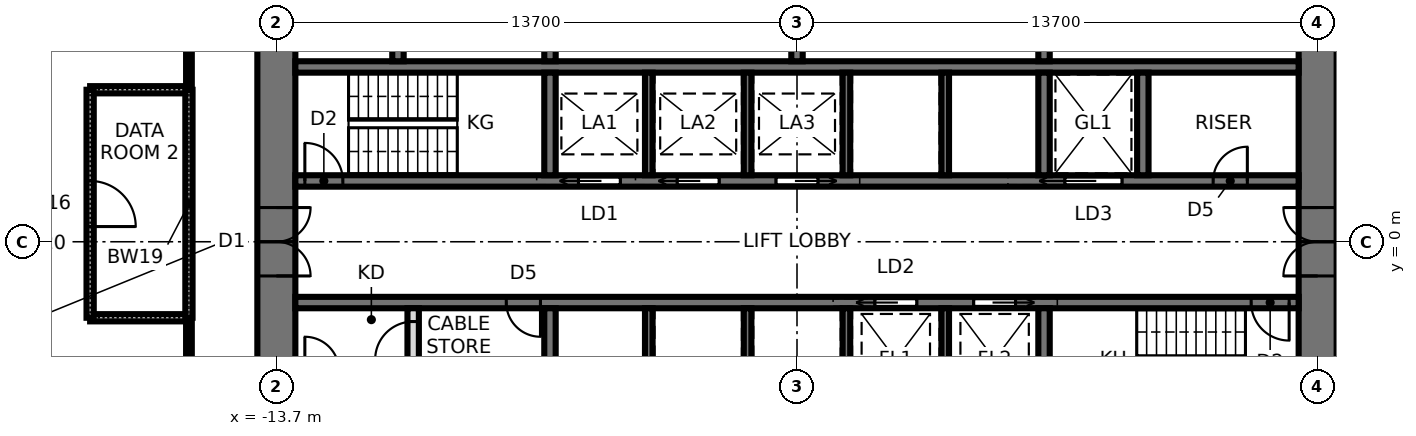
"""IFC4 building model, lengths in metres.
Left out: names, types, materials, properties, quantities, classifications, styles, units other than length and angle.
Written with IfcOpenShell. Run it as: python <this file> out.ifc"""

import sys

from ifc_helpers import new_model, si_unit, direction, frame, frame_2d, origin, place, context, subcontext, project, spatial, rectangle, extrude, element, fill, save


model = new_model("IFC4")
c1 = context("Model", 3, precision=1e-05, world=origin(), true_north=direction((0.0, 1.0)))
c2 = subcontext(c1, "Body", "Model", "MODEL_VIEW")
j1 = project(units=[si_unit("LENGTHUNIT", "METRE"), si_unit("PLANEANGLEUNIT", "RADIAN")], contexts=[c1])
p1 = place(None, origin())
s1 = spatial("IfcSite", under=j1, at=p1, CompositionType="ELEMENT")
p2 = place(p1, origin())
s2 = spatial("IfcBuilding", under=s1, at=p2, CompositionType="ELEMENT")
p3 = place(p2, frame((0.0, 0.0, 44.8)))
s3 = spatial("IfcBuildingStorey", under=s2, at=p3, CompositionType="ELEMENT", Elevation=44.8)
p4 = place(p3, frame((13.7, -9.5, 0.0), z_axis=(0.0, 0.0, 1.0), x_axis=(0.0, 1.0, 0.0)))
e1 = element("IfcWall", 1, at=p4, inside=s3, PredefinedType="SHEAR", context=c2, shape_type="SweptSolid", body=[
    extrude(rectangle(XDim=19.0, YDim=1.0, at=frame_2d((9.5, 0.0))), origin(), (0.0, 0.0, 1.0), 4.2),
])
p5 = place(p4, frame((8.6, 0.0, 0.0)))
e2 = element("IfcOpeningElement", 2, at=p5, cuts=e1, PredefinedType="OPENING", context=c2, shape_type="SweptSolid", body=[
    extrude(rectangle(XDim=1.8, YDim=2.4, at=frame_2d((0.9, 1.2))), frame((0.0, 0.51, 0.0), z_axis=(0.0, -1.0, 0.0), x_axis=(1.0, 0.0, 0.0)), (0.0, 0.0, 1.0), 1.02),
])
p6 = place(p3, frame((-13.7, 9.5, 0.0), z_axis=(0.0, 0.0, 1.0), x_axis=(0.0, -1.0, 0.0)))
e3 = element("IfcWall", 3, at=p6, inside=s3, PredefinedType="SHEAR", context=c2, shape_type="SweptSolid", body=[
    extrude(rectangle(XDim=19.0, YDim=1.0, at=frame_2d((9.5, 0.0))), origin(), (0.0, 0.0, 1.0), 4.2),
])
p7 = place(p6, frame((8.6, 0.0, 0.0)))
e4 = element("IfcOpeningElement", 4, at=p7, cuts=e3, PredefinedType="OPENING", context=c2, shape_type="SweptSolid", body=[
    extrude(rectangle(XDim=1.8, YDim=2.4, at=frame_2d((0.9, 1.2))), frame((0.0, 0.51, 0.0), z_axis=(0.0, -1.0, 0.0), x_axis=(1.0, 0.0, 0.0)), (0.0, 0.0, 1.0), 1.02),
])
p8 = place(p3, frame((-13.2, 1.6, 0.0), z_axis=(0.0, 0.0, 1.0), x_axis=(1.0, 0.0, 0.0)))
e5 = element("IfcWall", 5, at=p8, inside=s3, PredefinedType="SHEAR", context=c2, shape_type="SweptSolid", body=[
    extrude(rectangle(XDim=26.4, YDim=0.3, at=frame_2d((13.2, 0.0))), origin(), (0.0, 0.0, 1.0), 4.2),
])
p9 = place(p8, frame((0.25, 0.0, 0.0)))
e6 = element("IfcOpeningElement", 6, at=p9, cuts=e5, PredefinedType="OPENING", context=c2, shape_type="SweptSolid", body=[
    extrude(rectangle(XDim=1.0, YDim=2.1, at=frame_2d((0.5, 1.05))), frame((0.0, 0.16, 0.0), z_axis=(0.0, -1.0, 0.0), x_axis=(1.0, 0.0, 0.0)), (0.0, 0.0, 1.0), 0.32),
])
p10 = place(p8, frame((20.25, 0.0, 0.0)))
e7 = element("IfcOpeningElement", 7, at=p10, cuts=e5, PredefinedType="OPENING", context=c2, shape_type="SweptSolid", body=[
    extrude(rectangle(XDim=1.5, YDim=2.4, at=frame_2d((0.75, 1.2))), frame((0.0, 0.16, 0.0), z_axis=(0.0, -1.0, 0.0), x_axis=(1.0, 0.0, 0.0)), (0.0, 0.0, 1.0), 0.32),
])
p11 = place(p8, frame((7.45, 0.0, 0.0)))
e8 = element("IfcOpeningElement", 8, at=p11, cuts=e5, PredefinedType="OPENING", context=c2, shape_type="SweptSolid", body=[
    extrude(rectangle(XDim=1.1, YDim=2.3, at=frame_2d((0.55, 1.15))), frame((0.0, 0.16, 0.0), z_axis=(0.0, -1.0, 0.0), x_axis=(1.0, 0.0, 0.0)), (0.0, 0.0, 1.0), 0.32),
])
p12 = place(p8, frame((10.05, 0.0, 0.0)))
e9 = element("IfcOpeningElement", 9, at=p12, cuts=e5, PredefinedType="OPENING", context=c2, shape_type="SweptSolid", body=[
    extrude(rectangle(XDim=1.1, YDim=2.3, at=frame_2d((0.55, 1.15))), frame((0.0, 0.16, 0.0), z_axis=(0.0, -1.0, 0.0), x_axis=(1.0, 0.0, 0.0)), (0.0, 0.0, 1.0), 0.32),
])
p13 = place(p8, frame((12.65, 0.0, 0.0)))
e10 = element("IfcOpeningElement", 10, at=p13, cuts=e5, PredefinedType="OPENING", context=c2, shape_type="SweptSolid", body=[
    extrude(rectangle(XDim=1.1, YDim=2.3, at=frame_2d((0.55, 1.15))), frame((0.0, 0.16, 0.0), z_axis=(0.0, -1.0, 0.0), x_axis=(1.0, 0.0, 0.0)), (0.0, 0.0, 1.0), 0.32),
])
p14 = place(p8, frame((24.15, 0.0, 0.0)))
e11 = element("IfcOpeningElement", 11, at=p14, cuts=e5, PredefinedType="OPENING", context=c2, shape_type="SweptSolid", body=[
    extrude(rectangle(XDim=0.9, YDim=2.1, at=frame_2d((0.45, 1.05))), frame((0.0, 0.16, 0.0), z_axis=(0.0, -1.0, 0.0), x_axis=(1.0, 0.0, 0.0)), (0.0, 0.0, 1.0), 0.32),
])
p15 = place(p3, frame((-13.2, -1.6, 0.0), z_axis=(0.0, 0.0, 1.0), x_axis=(1.0, 0.0, 0.0)))
e12 = element("IfcWall", 12, at=p15, inside=s3, PredefinedType="SHEAR", context=c2, shape_type="SweptSolid", body=[
    extrude(rectangle(XDim=26.4, YDim=0.3, at=frame_2d((13.2, 0.0))), origin(), (0.0, 0.0, 1.0), 4.2),
])
p16 = place(p15, frame((25.15, 0.0, 0.0)))
e13 = element("IfcOpeningElement", 13, at=p16, cuts=e12, PredefinedType="OPENING", context=c2, shape_type="SweptSolid", body=[
    extrude(rectangle(XDim=1.0, YDim=2.1, at=frame_2d((0.5, 1.05))), frame((0.0, 0.16, 0.0), z_axis=(0.0, -1.0, 0.0), x_axis=(1.0, 0.0, 0.0)), (0.0, 0.0, 1.0), 0.32),
])
p17 = place(p15, frame((15.25, 0.0, 0.0)))
e14 = element("IfcOpeningElement", 14, at=p17, cuts=e12, PredefinedType="OPENING", context=c2, shape_type="SweptSolid", body=[
    extrude(rectangle(XDim=1.1, YDim=2.3, at=frame_2d((0.55, 1.15))), frame((0.0, 0.16, 0.0), z_axis=(0.0, -1.0, 0.0), x_axis=(1.0, 0.0, 0.0)), (0.0, 0.0, 1.0), 0.32),
])
p18 = place(p15, frame((17.85, 0.0, 0.0)))
e15 = element("IfcOpeningElement", 15, at=p18, cuts=e12, PredefinedType="OPENING", context=c2, shape_type="SweptSolid", body=[
    extrude(rectangle(XDim=1.1, YDim=2.3, at=frame_2d((0.55, 1.15))), frame((0.0, 0.16, 0.0), z_axis=(0.0, -1.0, 0.0), x_axis=(1.0, 0.0, 0.0)), (0.0, 0.0, 1.0), 0.32),
])
p19 = place(p15, frame((5.55, 0.0, 0.0)))
e16 = element("IfcOpeningElement", 16, at=p19, cuts=e12, PredefinedType="OPENING", context=c2, shape_type="SweptSolid", body=[
    extrude(rectangle(XDim=0.9, YDim=2.1, at=frame_2d((0.45, 1.05))), frame((0.0, 0.16, 0.0), z_axis=(0.0, -1.0, 0.0), x_axis=(1.0, 0.0, 0.0)), (0.0, 0.0, 1.0), 0.32),
])
p20 = place(p3, frame((-13.2, 4.6, 0.0), z_axis=(0.0, 0.0, 1.0), x_axis=(1.0, 0.0, 0.0)))
e17 = element("IfcWall", 17, at=p20, inside=s3, PredefinedType="SHEAR", context=c2, shape_type="SweptSolid", body=[
    extrude(rectangle(XDim=26.4, YDim=0.3, at=frame_2d((13.2, 0.0))), origin(), (0.0, 0.0, 1.0), 4.2),
])
p21 = place(p3, frame((-6.5, 1.75, 0.0), z_axis=(0.0, 0.0, 1.0), x_axis=(0.0, 1.0, 0.0)))
e18 = element("IfcWall", 18, at=p21, inside=s3, PredefinedType="SHEAR", context=c2, shape_type="SweptSolid", body=[
    extrude(rectangle(XDim=2.7, YDim=0.3, at=frame_2d((1.35, 0.0))), origin(), (0.0, 0.0, 1.0), 4.2),
])
p22 = place(p3, frame((-6.5, 4.75, 0.0), z_axis=(0.0, 0.0, 1.0), x_axis=(0.0, 1.0, 0.0)))
e19 = element("IfcWall", 19, at=p22, inside=s3, PredefinedType="SHEAR", context=c2, shape_type="SweptSolid", body=[
    extrude(rectangle(XDim=3.75, YDim=0.3, at=frame_2d((1.875, 0.0))), origin(), (0.0, 0.0, 1.0), 4.2),
])
p23 = place(p3, frame((6.5, 1.75, 0.0), z_axis=(0.0, 0.0, 1.0), x_axis=(0.0, 1.0, 0.0)))
e20 = element("IfcWall", 20, at=p23, inside=s3, PredefinedType="SHEAR", context=c2, shape_type="SweptSolid", body=[
    extrude(rectangle(XDim=2.7, YDim=0.3, at=frame_2d((1.35, 0.0))), origin(), (0.0, 0.0, 1.0), 4.2),
])
p24 = place(p3, frame((6.5, 4.75, 0.0), z_axis=(0.0, 0.0, 1.0), x_axis=(0.0, 1.0, 0.0)))
e21 = element("IfcWall", 21, at=p24, inside=s3, PredefinedType="SHEAR", context=c2, shape_type="SweptSolid", body=[
    extrude(rectangle(XDim=3.75, YDim=0.3, at=frame_2d((1.875, 0.0))), origin(), (0.0, 0.0, 1.0), 4.2),
])
for number, where, z_axis, x_axis in (
    (22, (-3.9, 1.75, 0.0), (0.0, 0.0, 1.0), (0.0, 1.0, 0.0)),
    (23, (-1.3, 1.75, 0.0), (0.0, 0.0, 1.0), (0.0, 1.0, 0.0)),
    (24, (1.3, 1.75, 0.0), (0.0, 0.0, 1.0), (0.0, 1.0, 0.0)),
    (25, (3.9, 1.75, 0.0), (0.0, 0.0, 1.0), (0.0, 1.0, 0.0)),
):
    element("IfcWall", number, at=place(p3, frame(where, z_axis=z_axis, x_axis=x_axis)), inside=s3, PredefinedType="SHEAR", context=c2, shape_type="SweptSolid", body=[
        extrude(rectangle(XDim=2.7, YDim=0.2, at=frame_2d((1.35, 0.0))), origin(), (0.0, 0.0, 1.0), 4.2),
    ])
p25 = place(p3, frame((0.0, 4.75, 0.0), z_axis=(0.0, 0.0, 1.0), x_axis=(0.0, 1.0, 0.0)))
e26 = element("IfcWall", 26, at=p25, inside=s3, PredefinedType="SHEAR", context=c2, shape_type="SweptSolid", body=[
    extrude(rectangle(XDim=3.75, YDim=0.3, at=frame_2d((1.875, 0.0))), origin(), (0.0, 0.0, 1.0), 4.2),
])
for number, where, z_axis, x_axis in (
    (27, (-6.5, -1.75, 0.0), (0.0, 0.0, 1.0), (0.0, -1.0, 0.0)),
    (28, (6.5, -1.75, 0.0), (0.0, 0.0, 1.0), (0.0, -1.0, 0.0)),
):
    element("IfcWall", number, at=place(p3, frame(where, z_axis=z_axis, x_axis=x_axis)), inside=s3, PredefinedType="SHEAR", context=c2, shape_type="SweptSolid", body=[
        extrude(rectangle(XDim=2.7, YDim=0.3, at=frame_2d((1.35, 0.0))), origin(), (0.0, 0.0, 1.0), 4.2),
    ])
for number, where, z_axis, x_axis in (
    (29, (-3.9, -1.75, 0.0), (0.0, 0.0, 1.0), (0.0, -1.0, 0.0)),
    (30, (-1.3, -1.75, 0.0), (0.0, 0.0, 1.0), (0.0, -1.0, 0.0)),
    (31, (1.3, -1.75, 0.0), (0.0, 0.0, 1.0), (0.0, -1.0, 0.0)),
    (32, (3.9, -1.75, 0.0), (0.0, 0.0, 1.0), (0.0, -1.0, 0.0)),
):
    element("IfcWall", number, at=place(p3, frame(where, z_axis=z_axis, x_axis=x_axis)), inside=s3, PredefinedType="SHEAR", context=c2, shape_type="SweptSolid", body=[
        extrude(rectangle(XDim=2.7, YDim=0.2, at=frame_2d((1.35, 0.0))), origin(), (0.0, 0.0, 1.0), 4.2),
    ])
p26 = place(p3, frame((-10.5, 4.75, 0.0), z_axis=(0.0, 0.0, 1.0), x_axis=(0.0, 1.0, 0.0)))
e33 = element("IfcWall", 33, at=p26, inside=s3, PredefinedType="SHEAR", context=c2, shape_type="SweptSolid", body=[
    extrude(rectangle(XDim=3.75, YDim=0.3, at=frame_2d((1.875, 0.0))), origin(), (0.0, 0.0, 1.0), 4.2),
])
p27 = place(p3, frame((9.1, 1.75, 0.0), z_axis=(0.0, 0.0, 1.0), x_axis=(0.0, 1.0, 0.0)))
e34 = element("IfcWall", 34, at=p27, inside=s3, PredefinedType="SHEAR", context=c2, shape_type="SweptSolid", body=[
    extrude(rectangle(XDim=2.7, YDim=0.3, at=frame_2d((1.35, 0.0))), origin(), (0.0, 0.0, 1.0), 4.2),
])
p28 = place(p3, frame((-10.1, -3.25, 0.0), z_axis=(0.0, 0.0, 1.0), x_axis=(0.0, 1.0, 0.0)))
e35 = element("IfcWall", 35, at=p28, inside=s3, PredefinedType="PARTITIONING", context=c2, shape_type="SweptSolid", body=[
    extrude(rectangle(XDim=1.5, YDim=0.3, at=frame_2d((0.75, 0.0))), origin(), (0.0, 0.0, 1.0), 4.04),
])
p29 = place(p28, frame((0.15, 0.0, 0.0)))
e36 = element("IfcOpeningElement", 36, at=p29, cuts=e35, PredefinedType="OPENING", context=c2, shape_type="SweptSolid", body=[
    extrude(rectangle(XDim=1.0, YDim=2.4, at=frame_2d((0.5, 1.2))), frame((0.0, 0.16, 0.0), z_axis=(0.0, -1.0, 0.0), x_axis=(1.0, 0.0, 0.0)), (0.0, 0.0, 1.0), 0.32),
])
p30 = place(p3, frame((-18.6, -2.0, 0.0), z_axis=(0.0, 0.0, 1.0), x_axis=(1.0, 0.0, 0.0)))
e37 = element("IfcWall", 37, at=p30, inside=s3, PredefinedType="SOLIDWALL", context=c2, shape_type="SweptSolid", body=[
    extrude(rectangle(XDim=2.6, YDim=0.19, at=frame_2d((1.3, 0.0))), origin(), (0.0, 0.0, 1.0), 4.04),
])
p31 = place(p3, frame((-16.0, -2.0, 0.0), z_axis=(0.0, 0.0, 1.0), x_axis=(0.0, -1.0, 0.0)))
e38 = element("IfcWall", 38, at=p31, inside=s3, PredefinedType="PARTITIONING", context=c2, shape_type="SweptSolid", body=[
    extrude(rectangle(XDim=9.3, YDim=0.15, at=frame_2d((4.65, 0.0))), origin(), (0.0, 0.0, 1.0), 4.04),
])
p32 = place(p31, frame((4.325, 0.0, 0.0)))
e39 = element("IfcOpeningElement", 39, at=p32, cuts=e38, PredefinedType="OPENING", context=c2, shape_type="SweptSolid", body=[
    extrude(rectangle(XDim=2.0, YDim=2.4, at=frame_2d((1.0, 1.2))), frame((0.0, 0.085, 0.0), z_axis=(0.0, -1.0, 0.0), x_axis=(1.0, 0.0, 0.0)), (0.0, 0.0, 1.0), 0.17),
])
p33 = place(p3, frame((-16.0, 11.3, 0.0), z_axis=(0.0, 0.0, 1.0), x_axis=(0.0, -1.0, 0.0)))
e40 = element("IfcWall", 40, at=p33, inside=s3, PredefinedType="PARTITIONING", context=c2, shape_type="SweptSolid", body=[
    extrude(rectangle(XDim=7.3, YDim=0.15, at=frame_2d((3.65, 0.0))), origin(), (0.0, 0.0, 1.0), 4.04),
])
p34 = place(p33, frame((2.65, 0.0, 0.0)))
e41 = element("IfcOpeningElement", 41, at=p34, cuts=e40, PredefinedType="OPENING", context=c2, shape_type="SweptSolid", body=[
    extrude(rectangle(XDim=2.0, YDim=2.4, at=frame_2d((1.0, 1.2))), frame((0.0, 0.085, 0.0), z_axis=(0.0, -1.0, 0.0), x_axis=(1.0, 0.0, 0.0)), (0.0, 0.0, 1.0), 0.17),
])
p35 = place(p3, frame((-16.0, 4.0, 0.0), z_axis=(0.0, 0.0, 1.0), x_axis=(-1.0, 0.0, 0.0)))
e42 = element("IfcWall", 42, at=p35, inside=s3, PredefinedType="SOLIDWALL", context=c2, shape_type="SweptSolid", body=[
    extrude(rectangle(XDim=2.6, YDim=0.19, at=frame_2d((1.3, 0.0))), origin(), (0.0, 0.0, 1.0), 4.04),
])
p36 = place(p3, frame((-16.0, -2.0, 0.0), z_axis=(0.0, 0.0, 1.0), x_axis=(0.0, 1.0, 0.0)))
e43 = element("IfcWall", 43, at=p36, inside=s3, PredefinedType="SOLIDWALL", context=c2, shape_type="SweptSolid", body=[
    extrude(rectangle(XDim=6.0, YDim=0.19, at=frame_2d((3.0, 0.0))), origin(), (0.0, 0.0, 1.0), 4.04),
])
p37 = place(p3, frame((-18.6, 4.0, 0.0), z_axis=(0.0, 0.0, 1.0), x_axis=(0.0, -1.0, 0.0)))
e44 = element("IfcWall", 44, at=p37, inside=s3, PredefinedType="SOLIDWALL", context=c2, shape_type="SweptSolid", body=[
    extrude(rectangle(XDim=6.0, YDim=0.19, at=frame_2d((3.0, 0.0))), origin(), (0.0, 0.0, 1.0), 4.04),
])
p38 = place(p37, frame((2.4, 0.0, 0.0)))
e45 = element("IfcOpeningElement", 45, at=p38, cuts=e44, PredefinedType="OPENING", context=c2, shape_type="SweptSolid", body=[
    extrude(rectangle(XDim=1.2, YDim=2.1, at=frame_2d((0.6, 1.05))), frame((0.0, 0.105, 0.0), z_axis=(0.0, -1.0, 0.0), x_axis=(1.0, 0.0, 0.0)), (0.0, 0.0, 1.0), 0.21),
])
p39 = place(p7, origin())
e46 = element("IfcDoor", 46, at=p39, inside=s3, OperationType="DOUBLE_DOOR_SINGLE_SWING", PredefinedType="DOOR", context=c2, shape_type="SweptSolid", body=[
    extrude(rectangle(XDim=1.72, YDim=2.36, at=frame_2d((0.9, 1.18))), frame((0.0, 0.025, 0.0), z_axis=(0.0, -1.0, 0.0), x_axis=(1.0, 0.0, 0.0)), (0.0, 0.0, 1.0), 0.05),
    extrude(rectangle(XDim=0.04, YDim=2.4, at=frame_2d((0.02, 1.2))), frame((0.0, 0.25, 0.0), z_axis=(0.0, -1.0, 0.0), x_axis=(1.0, 0.0, 0.0)), (0.0, 0.0, 1.0), 0.5),
    extrude(rectangle(XDim=0.04, YDim=2.4, at=frame_2d((1.78, 1.2))), frame((0.0, 0.25, 0.0), z_axis=(0.0, -1.0, 0.0), x_axis=(1.0, 0.0, 0.0)), (0.0, 0.0, 1.0), 0.5),
    extrude(rectangle(XDim=1.72, YDim=0.04, at=frame_2d((0.9, 2.38))), frame((0.0, 0.25, 0.0), z_axis=(0.0, -1.0, 0.0), x_axis=(1.0, 0.0, 0.0)), (0.0, 0.0, 1.0), 0.5),
])
fill(e4, e46)
p40 = place(p5, origin())
e47 = element("IfcDoor", 47, at=p40, inside=s3, OperationType="DOUBLE_DOOR_SINGLE_SWING", PredefinedType="DOOR", context=c2, shape_type="SweptSolid", body=[
    extrude(rectangle(XDim=1.72, YDim=2.36, at=frame_2d((0.9, 1.18))), frame((0.0, 0.025, 0.0), z_axis=(0.0, -1.0, 0.0), x_axis=(1.0, 0.0, 0.0)), (0.0, 0.0, 1.0), 0.05),
    extrude(rectangle(XDim=0.04, YDim=2.4, at=frame_2d((0.02, 1.2))), frame((0.0, 0.25, 0.0), z_axis=(0.0, -1.0, 0.0), x_axis=(1.0, 0.0, 0.0)), (0.0, 0.0, 1.0), 0.5),
    extrude(rectangle(XDim=0.04, YDim=2.4, at=frame_2d((1.78, 1.2))), frame((0.0, 0.25, 0.0), z_axis=(0.0, -1.0, 0.0), x_axis=(1.0, 0.0, 0.0)), (0.0, 0.0, 1.0), 0.5),
    extrude(rectangle(XDim=1.72, YDim=0.04, at=frame_2d((0.9, 2.38))), frame((0.0, 0.25, 0.0), z_axis=(0.0, -1.0, 0.0), x_axis=(1.0, 0.0, 0.0)), (0.0, 0.0, 1.0), 0.5),
])
fill(e2, e47)
p41 = place(p9, origin())
e48 = element("IfcDoor", 48, at=p41, inside=s3, OperationType="SINGLE_SWING_LEFT", PredefinedType="DOOR", context=c2, shape_type="SweptSolid", body=[
    extrude(rectangle(XDim=1.0, YDim=2.1, at=frame_2d((0.5, 1.05))), frame((0.0, 0.025, 0.0), z_axis=(0.0, -1.0, 0.0), x_axis=(1.0, 0.0, 0.0)), (0.0, 0.0, 1.0), 0.05),
])
fill(e6, e48)
p42 = place(p16, frame((1.0, 0.0, 0.0), z_axis=(0.0, 0.0, 1.0), x_axis=(-1.0, 0.0, 0.0)))
e49 = element("IfcDoor", 49, at=p42, inside=s3, OperationType="SINGLE_SWING_LEFT", PredefinedType="DOOR", context=c2, shape_type="SweptSolid", body=[
    extrude(rectangle(XDim=1.0, YDim=2.1, at=frame_2d((0.5, 1.05))), frame((0.0, 0.025, 0.0), z_axis=(0.0, -1.0, 0.0), x_axis=(1.0, 0.0, 0.0)), (0.0, 0.0, 1.0), 0.05),
])
fill(e13, e49)
p43 = place(p10, origin())
e50 = element("IfcDoor", 50, at=p43, inside=s3, OperationType="SLIDING_TO_LEFT", PredefinedType="DOOR", context=c2, shape_type="SweptSolid", body=[
    extrude(rectangle(XDim=1.5, YDim=2.4, at=frame_2d((0.75, 1.2))), frame((0.0, 0.025, 0.0), z_axis=(0.0, -1.0, 0.0), x_axis=(1.0, 0.0, 0.0)), (0.0, 0.0, 1.0), 0.05),
])
fill(e7, e50)
p44 = place(p11, origin())
e51 = element("IfcDoor", 51, at=p44, inside=s3, OperationType="SLIDING_TO_LEFT", PredefinedType="DOOR", context=c2, shape_type="SweptSolid", body=[
    extrude(rectangle(XDim=1.1, YDim=2.3, at=frame_2d((0.55, 1.15))), frame((0.0, 0.025, 0.0), z_axis=(0.0, -1.0, 0.0), x_axis=(1.0, 0.0, 0.0)), (0.0, 0.0, 1.0), 0.05),
])
fill(e8, e51)
p45 = place(p12, origin())
e52 = element("IfcDoor", 52, at=p45, inside=s3, OperationType="SLIDING_TO_LEFT", PredefinedType="DOOR", context=c2, shape_type="SweptSolid", body=[
    extrude(rectangle(XDim=1.1, YDim=2.3, at=frame_2d((0.55, 1.15))), frame((0.0, 0.025, 0.0), z_axis=(0.0, -1.0, 0.0), x_axis=(1.0, 0.0, 0.0)), (0.0, 0.0, 1.0), 0.05),
])
fill(e9, e52)
p46 = place(p13, origin())
e53 = element("IfcDoor", 53, at=p46, inside=s3, OperationType="SLIDING_TO_RIGHT", PredefinedType="DOOR", context=c2, shape_type="SweptSolid", body=[
    extrude(rectangle(XDim=1.1, YDim=2.3, at=frame_2d((0.55, 1.15))), frame((0.0, 0.025, 0.0), z_axis=(0.0, -1.0, 0.0), x_axis=(1.0, 0.0, 0.0)), (0.0, 0.0, 1.0), 0.05),
])
fill(e10, e53)
p47 = place(p17, frame((1.1, 0.0, 0.0), z_axis=(0.0, 0.0, 1.0), x_axis=(-1.0, 0.0, 0.0)))
e54 = element("IfcDoor", 54, at=p47, inside=s3, OperationType="SLIDING_TO_RIGHT", PredefinedType="DOOR", context=c2, shape_type="SweptSolid", body=[
    extrude(rectangle(XDim=1.1, YDim=2.3, at=frame_2d((0.55, 1.15))), frame((0.0, 0.025, 0.0), z_axis=(0.0, -1.0, 0.0), x_axis=(1.0, 0.0, 0.0)), (0.0, 0.0, 1.0), 0.05),
])
fill(e14, e54)
p48 = place(p18, frame((1.1, 0.0, 0.0), z_axis=(0.0, 0.0, 1.0), x_axis=(-1.0, 0.0, 0.0)))
e55 = element("IfcDoor", 55, at=p48, inside=s3, OperationType="SLIDING_TO_LEFT", PredefinedType="DOOR", context=c2, shape_type="SweptSolid", body=[
    extrude(rectangle(XDim=1.1, YDim=2.3, at=frame_2d((0.55, 1.15))), frame((0.0, 0.025, 0.0), z_axis=(0.0, -1.0, 0.0), x_axis=(1.0, 0.0, 0.0)), (0.0, 0.0, 1.0), 0.05),
])
fill(e15, e55)
p49 = place(p14, origin())
e56 = element("IfcDoor", 56, at=p49, inside=s3, OperationType="SINGLE_SWING_RIGHT", PredefinedType="DOOR", context=c2, shape_type="SweptSolid", body=[
    extrude(rectangle(XDim=0.9, YDim=2.1, at=frame_2d((0.45, 1.05))), frame((0.0, 0.025, 0.0), z_axis=(0.0, -1.0, 0.0), x_axis=(1.0, 0.0, 0.0)), (0.0, 0.0, 1.0), 0.05),
])
fill(e11, e56)
p50 = place(p19, frame((0.9, 0.0, 0.0), z_axis=(0.0, 0.0, 1.0), x_axis=(-1.0, 0.0, 0.0)))
e57 = element("IfcDoor", 57, at=p50, inside=s3, OperationType="SINGLE_SWING_LEFT", PredefinedType="DOOR", context=c2, shape_type="SweptSolid", body=[
    extrude(rectangle(XDim=0.9, YDim=2.1, at=frame_2d((0.45, 1.05))), frame((0.0, 0.025, 0.0), z_axis=(0.0, -1.0, 0.0), x_axis=(1.0, 0.0, 0.0)), (0.0, 0.0, 1.0), 0.05),
])
fill(e16, e57)
p51 = place(p29, origin())
e58 = element("IfcDoor", 58, at=p51, inside=s3, OperationType="SINGLE_SWING_LEFT", PredefinedType="DOOR", context=c2, shape_type="SweptSolid", body=[
    extrude(rectangle(XDim=1.0, YDim=2.4, at=frame_2d((0.5, 1.2))), frame((0.0, 0.025, 0.0), z_axis=(0.0, -1.0, 0.0), x_axis=(1.0, 0.0, 0.0)), (0.0, 0.0, 1.0), 0.05),
])
fill(e36, e58)
p52 = place(p38, origin())
e59 = element("IfcDoor", 59, at=p52, inside=s3, OperationType="SINGLE_SWING_RIGHT", PredefinedType="DOOR", context=c2, shape_type="SweptSolid", body=[
    extrude(rectangle(XDim=1.2, YDim=2.1, at=frame_2d((0.6, 1.05))), frame((0.0, 0.025, 0.0), z_axis=(0.0, -1.0, 0.0), x_axis=(1.0, 0.0, 0.0)), (0.0, 0.0, 1.0), 0.05),
])
fill(e45, e59)
save(model, sys.argv[1])
